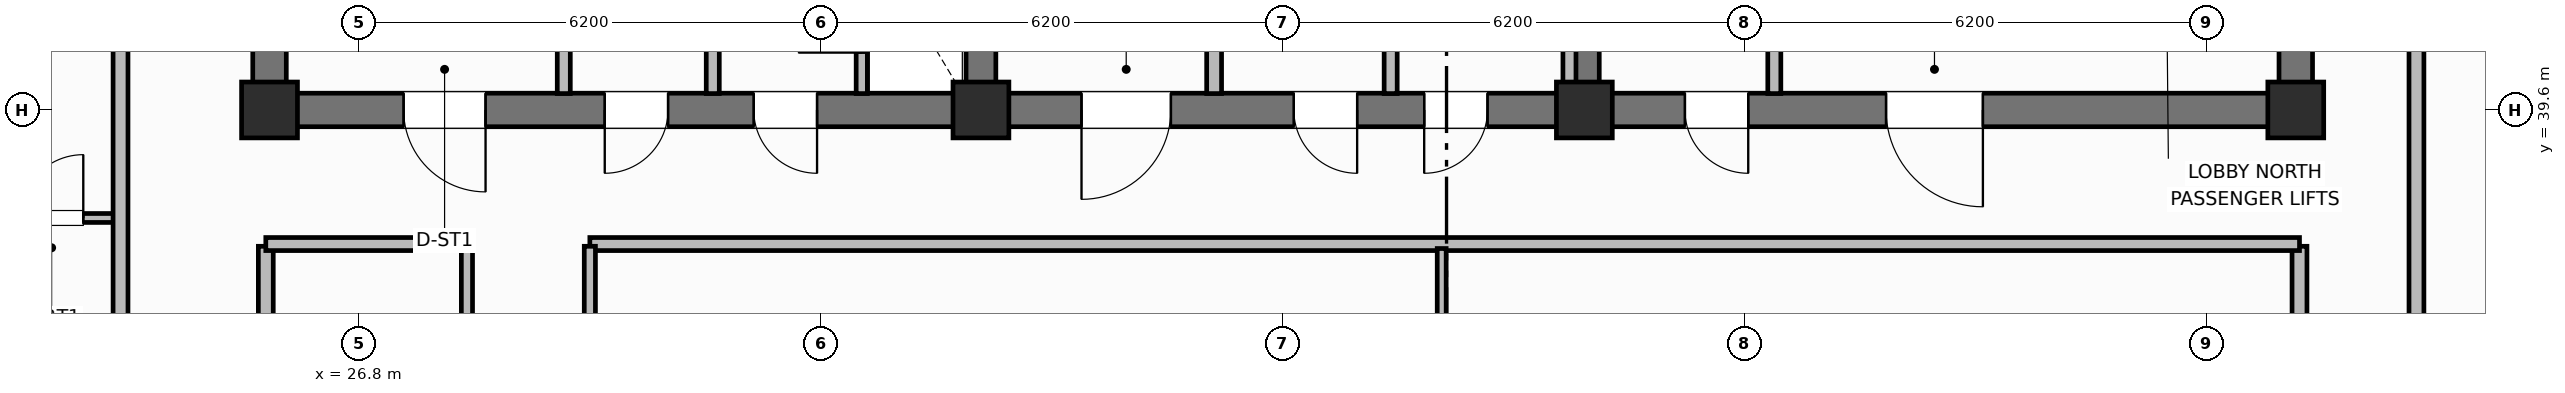
"""IFC4 building model, lengths in metres.
Left out: names, types, materials, properties, quantities, classifications, styles, units other than length and angle.
Written with IfcOpenShell. Run it as: python <this file> out.ifc"""

import sys

from ifc_helpers import new_model, si_unit, direction, frame, frame_2d, origin, origin_2d, place, context, subcontext, project, spatial, rectangle, extrude, element, fill, save


model = new_model("IFC4")
c1 = context("Model", 3, precision=1e-05, world=origin(), true_north=direction((0.0, 1.0)))
c2 = subcontext(c1, "Body", "Model", "MODEL_VIEW")
j1 = project(units=[si_unit("LENGTHUNIT", "METRE"), si_unit("PLANEANGLEUNIT", "RADIAN")], contexts=[c1])
p1 = place(None, origin())
s1 = spatial("IfcSite", under=j1, at=p1, CompositionType="ELEMENT")
p2 = place(p1, origin())
s2 = spatial("IfcBuilding", under=s1, at=p2, CompositionType="ELEMENT")
p3 = place(p2, frame((0.0, 0.0, 293.5)))
s3 = spatial("IfcBuildingStorey", under=s2, at=p3, CompositionType="ELEMENT", Elevation=293.5)
for number, where, z_axis, x_axis in (
    (1, (25.6, 39.825, 0.0), (0.0, 0.0, 1.0), (0.0, 1.0, 0.0)),
    (2, (52.8, 39.825, 0.0), (0.0, 0.0, 1.0), (0.0, 1.0, 0.0)),
):
    element("IfcWall", number, at=place(p3, frame(where, z_axis=z_axis, x_axis=x_axis)), inside=s3, PredefinedType="SHEAR", context=c2, shape_type="SweptSolid", body=[
        extrude(rectangle(XDim=5.75, YDim=0.45, at=frame_2d((2.875, 0.0))), origin(), (0.0, 0.0, 1.0), 3.7),
    ])
p4 = place(p3, frame((52.8, 39.6, 0.0), z_axis=(0.0, 0.0, 1.0), x_axis=(-1.0, 0.0, 0.0)))
e3 = element("IfcWall", 3, at=p4, inside=s3, PredefinedType="SHEAR", context=c2, shape_type="SweptSolid", body=[
    extrude(rectangle(XDim=27.2, YDim=0.45, at=frame_2d((13.6, 0.0))), origin(), (0.0, 0.0, 1.0), 3.7),
])
p5 = place(p4, frame((24.3, 0.0, 0.0)))
e4 = element("IfcOpeningElement", 4, at=p5, cuts=e3, PredefinedType="OPENING", context=c2, shape_type="SweptSolid", body=[
    extrude(rectangle(XDim=1.1, YDim=2.15, at=frame_2d((0.55, 1.075))), frame((0.0, 0.235, 0.0), z_axis=(0.0, -1.0, 0.0), x_axis=(1.0, 0.0, 0.0)), (0.0, 0.0, 1.0), 0.47),
])
p6 = place(p4, frame((21.85, 0.0, 0.0)))
e5 = element("IfcOpeningElement", 5, at=p6, cuts=e3, PredefinedType="OPENING", context=c2, shape_type="SweptSolid", body=[
    extrude(rectangle(XDim=0.85, YDim=2.1, at=frame_2d((0.425, 1.05))), frame((0.0, 0.235, 0.0), z_axis=(0.0, -1.0, 0.0), x_axis=(1.0, 0.0, 0.0)), (0.0, 0.0, 1.0), 0.47),
])
p7 = place(p4, frame((19.85, 0.0, 0.0)))
e6 = element("IfcOpeningElement", 6, at=p7, cuts=e3, PredefinedType="OPENING", context=c2, shape_type="SweptSolid", body=[
    extrude(rectangle(XDim=0.85, YDim=2.1, at=frame_2d((0.425, 1.05))), frame((0.0, 0.235, 0.0), z_axis=(0.0, -1.0, 0.0), x_axis=(1.0, 0.0, 0.0)), (0.0, 0.0, 1.0), 0.47),
])
p8 = place(p4, frame((15.1, 0.0, 0.0)))
e7 = element("IfcOpeningElement", 7, at=p8, cuts=e3, PredefinedType="OPENING", context=c2, shape_type="SweptSolid", body=[
    extrude(rectangle(XDim=1.2, YDim=2.15, at=frame_2d((0.6, 1.075))), frame((0.0, 0.235, 0.0), z_axis=(0.0, -1.0, 0.0), x_axis=(1.0, 0.0, 0.0)), (0.0, 0.0, 1.0), 0.47),
])
p9 = place(p4, frame((12.6, 0.0, 0.0)))
e8 = element("IfcOpeningElement", 8, at=p9, cuts=e3, PredefinedType="OPENING", context=c2, shape_type="SweptSolid", body=[
    extrude(rectangle(XDim=0.85, YDim=2.1, at=frame_2d((0.425, 1.05))), frame((0.0, 0.235, 0.0), z_axis=(0.0, -1.0, 0.0), x_axis=(1.0, 0.0, 0.0)), (0.0, 0.0, 1.0), 0.47),
])
p10 = place(p4, frame((10.85, 0.0, 0.0)))
e9 = element("IfcOpeningElement", 9, at=p10, cuts=e3, PredefinedType="OPENING", context=c2, shape_type="SweptSolid", body=[
    extrude(rectangle(XDim=0.85, YDim=2.1, at=frame_2d((0.425, 1.05))), frame((0.0, 0.235, 0.0), z_axis=(0.0, -1.0, 0.0), x_axis=(1.0, 0.0, 0.0)), (0.0, 0.0, 1.0), 0.47),
])
p11 = place(p4, frame((7.35, 0.0, 0.0)))
e10 = element("IfcOpeningElement", 10, at=p11, cuts=e3, PredefinedType="OPENING", context=c2, shape_type="SweptSolid", body=[
    extrude(rectangle(XDim=0.85, YDim=2.1, at=frame_2d((0.425, 1.05))), frame((0.0, 0.235, 0.0), z_axis=(0.0, -1.0, 0.0), x_axis=(1.0, 0.0, 0.0)), (0.0, 0.0, 1.0), 0.47),
])
p12 = place(p4, frame((4.2, 0.0, 0.0)))
e11 = element("IfcOpeningElement", 11, at=p12, cuts=e3, PredefinedType="OPENING", context=c2, shape_type="SweptSolid", body=[
    extrude(rectangle(XDim=1.3, YDim=2.2, at=frame_2d((0.65, 1.1))), frame((0.0, 0.235, 0.0), z_axis=(0.0, -1.0, 0.0), x_axis=(1.0, 0.0, 0.0)), (0.0, 0.0, 1.0), 0.47),
])
for number, where, z_axis, x_axis in (
    (12, (35.15, 39.825, 0.0), (0.0, 0.0, 1.0), (0.0, 1.0, 0.0)),
    (13, (43.25, 39.825, 0.0), (0.0, 0.0, 1.0), (0.0, 1.0, 0.0)),
):
    element("IfcWall", number, at=place(p3, frame(where, z_axis=z_axis, x_axis=x_axis)), inside=s3, PredefinedType="SHEAR", context=c2, shape_type="SweptSolid", body=[
        extrude(rectangle(XDim=5.75, YDim=0.4, at=frame_2d((2.875, 0.0))), origin(), (0.0, 0.0, 1.0), 3.7),
    ])
for number, where, z_axis, x_axis in (
    (14, (25.6, 39.6, 0.0), (0.0, 0.0, 1.0), (1.0, 0.0, 0.0)),
    (15, (35.15, 39.6, 0.0), (0.0, 0.0, 1.0), (1.0, 0.0, 0.0)),
    (16, (43.25, 39.6, 0.0), (0.0, 0.0, 1.0), (1.0, 0.0, 0.0)),
    (17, (52.8, 39.6, 0.0), (0.0, 0.0, 1.0), (1.0, 0.0, 0.0)),
):
    element("IfcColumn", number, at=place(p3, frame(where, z_axis=z_axis, x_axis=x_axis)), inside=s3, PredefinedType="COLUMN", context=c2, shape_type="SweptSolid", body=[
        extrude(rectangle(XDim=0.75, YDim=0.75, at=origin_2d()), origin(), (0.0, 0.0, 1.0), 3.7),
    ])
p13 = place(p3, frame((33.55, 39.82, 0.0), z_axis=(0.0, 0.0, 1.0), x_axis=(0.0, 1.0, 0.0)))
e18 = element("IfcWall", 18, at=p13, inside=s3, PredefinedType="PARTITIONING", context=c2, shape_type="SweptSolid", body=[
    extrude(rectangle(XDim=2.13, YDim=0.15, at=frame_2d((1.065, 0.0))), origin(), (0.0, 0.0, 1.0), 2.54),
])
p14 = place(p13, frame((0.55, 0.0, 0.0)))
e19 = element("IfcOpeningElement", 19, at=p14, cuts=e18, PredefinedType="OPENING", context=c2, shape_type="SweptSolid", body=[
    extrude(rectangle(XDim=0.85, YDim=2.05, at=frame_2d((0.425, 1.025))), frame((0.0, 0.085, 0.0), z_axis=(0.0, -1.0, 0.0), x_axis=(1.0, 0.0, 0.0)), (0.0, 0.0, 1.0), 0.17),
])
for number, where, z_axis, x_axis in (
    (20, (29.55, 39.82, 0.0), (0.0, 0.0, 1.0), (0.0, 1.0, 0.0)),
    (21, (31.55, 39.82, 0.0), (0.0, 0.0, 1.0), (0.0, 1.0, 0.0)),
):
    element("IfcWall", number, at=place(p3, frame(where, z_axis=z_axis, x_axis=x_axis)), inside=s3, PredefinedType="PARTITIONING", context=c2, shape_type="SweptSolid", body=[
        extrude(rectangle(XDim=2.13, YDim=0.175, at=frame_2d((1.065, 0.0))), origin(), (0.0, 0.0, 1.0), 2.54),
    ])
p15 = place(p3, frame((38.28, 39.82, 0.0), z_axis=(0.0, 0.0, 1.0), x_axis=(0.0, 1.0, 0.0)))
e22 = element("IfcWall", 22, at=p15, inside=s3, PredefinedType="PARTITIONING", context=c2, shape_type="SweptSolid", body=[
    extrude(rectangle(XDim=5.63, YDim=0.2, at=frame_2d((2.815, 0.0))), origin(), (0.0, 0.0, 1.0), 2.54),
])
for number, where, z_axis, x_axis in (
    (23, (43.05, 39.82, 0.0), (0.0, 0.0, 1.0), (0.0, 1.0, 0.0)),
    (24, (40.65, 39.82, 0.0), (0.0, 0.0, 1.0), (0.0, 1.0, 0.0)),
    (25, (45.8, 39.82, 0.0), (0.0, 0.0, 1.0), (0.0, 1.0, 0.0)),
):
    element("IfcWall", number, at=place(p3, frame(where, z_axis=z_axis, x_axis=x_axis)), inside=s3, PredefinedType="PARTITIONING", context=c2, shape_type="SweptSolid", body=[
        extrude(rectangle(XDim=5.63, YDim=0.175, at=frame_2d((2.815, 0.0))), origin(), (0.0, 0.0, 1.0), 2.54),
    ])
for number, where, z_axis, x_axis in (
    (26, (25.55, 18.63, 0.0), (0.0, 0.0, 1.0), (0.0, 1.0, 0.0)),
    (27, (52.85, 18.63, 0.0), (0.0, 0.0, 1.0), (0.0, 1.0, 0.0)),
):
    element("IfcWall", number, at=place(p3, frame(where, z_axis=z_axis, x_axis=x_axis)), inside=s3, PredefinedType="PARTITIONING", context=c2, shape_type="SweptSolid", body=[
        extrude(rectangle(XDim=19.14, YDim=0.2, at=frame_2d((9.57, 0.0))), origin(), (0.0, 0.0, 1.0), 2.54),
    ])
p16 = place(p3, frame((25.55, 37.8, 0.0), z_axis=(0.0, 0.0, 1.0), x_axis=(1.0, 0.0, 0.0)))
e28 = element("IfcWall", 28, at=p16, inside=s3, PredefinedType="PARTITIONING", context=c2, shape_type="SweptSolid", body=[
    extrude(rectangle(XDim=2.7, YDim=0.175, at=frame_2d((1.35, 0.0))), origin(), (0.0, 0.0, 1.0), 2.54),
])
p17 = place(p3, frame((29.9, 37.8, 0.0), z_axis=(0.0, 0.0, 1.0), x_axis=(1.0, 0.0, 0.0)))
e29 = element("IfcWall", 29, at=p17, inside=s3, PredefinedType="PARTITIONING", context=c2, shape_type="SweptSolid", body=[
    extrude(rectangle(XDim=22.95, YDim=0.175, at=frame_2d((11.475, 0.0))), origin(), (0.0, 0.0, 1.0), 2.54),
])
p18 = place(p3, frame((41.335, 25.56, 0.0), z_axis=(0.0, 0.0, 1.0), x_axis=(0.0, 1.0, 0.0)))
e30 = element("IfcWall", 30, at=p18, inside=s3, PredefinedType="PARTITIONING", context=c2, shape_type="SweptSolid", body=[
    extrude(rectangle(XDim=12.18, YDim=0.12, at=frame_2d((6.09, 0.0))), origin(), (0.0, 0.0, 1.0), 2.54),
])
p19 = place(p18, frame((2.0, 0.0, 0.0)))
e31 = element("IfcOpeningElement", 31, at=p19, cuts=e30, PredefinedType="OPENING", context=c2, shape_type="SweptSolid", body=[
    extrude(rectangle(XDim=0.9, YDim=2.1, at=frame_2d((0.45, 1.05))), frame((0.0, 0.07, 0.0), z_axis=(0.0, -1.0, 0.0), x_axis=(1.0, 0.0, 0.0)), (0.0, 0.0, 1.0), 0.14),
])
p20 = place(p3, frame((28.25, 18.63, 0.0), z_axis=(0.0, 0.0, 1.0), x_axis=(0.0, 1.0, 0.0)))
e32 = element("IfcWall", 32, at=p20, inside=s3, PredefinedType="PARTITIONING", context=c2, shape_type="SweptSolid", body=[
    extrude(rectangle(XDim=19.14, YDim=0.15, at=frame_2d((9.57, 0.0))), origin(), (0.0, 0.0, 1.0), 2.54),
])
p21 = place(p20, frame((3.0, 0.0, 0.0)))
e33 = element("IfcOpeningElement", 33, at=p21, cuts=e32, PredefinedType="OPENING", context=c2, shape_type="SweptSolid", body=[
    extrude(rectangle(XDim=0.9, YDim=2.1, at=frame_2d((0.45, 1.05))), frame((0.0, 0.085, 0.0), z_axis=(0.0, -1.0, 0.0), x_axis=(1.0, 0.0, 0.0)), (0.0, 0.0, 1.0), 0.17),
])
p22 = place(p20, frame((11.5, 0.0, 0.0)))
e34 = element("IfcOpeningElement", 34, at=p22, cuts=e32, PredefinedType="OPENING", context=c2, shape_type="SweptSolid", body=[
    extrude(rectangle(XDim=0.9, YDim=2.1, at=frame_2d((0.45, 1.05))), frame((0.0, 0.085, 0.0), z_axis=(0.0, -1.0, 0.0), x_axis=(1.0, 0.0, 0.0)), (0.0, 0.0, 1.0), 0.17),
])
p23 = place(p3, frame((29.9, 18.63, 0.0), z_axis=(0.0, 0.0, 1.0), x_axis=(0.0, 1.0, 0.0)))
e35 = element("IfcWall", 35, at=p23, inside=s3, PredefinedType="PARTITIONING", context=c2, shape_type="SweptSolid", body=[
    extrude(rectangle(XDim=19.14, YDim=0.15, at=frame_2d((9.57, 0.0))), origin(), (0.0, 0.0, 1.0), 2.54),
])
p24 = place(p23, frame((2.2, 0.0, 0.0)))
e36 = element("IfcOpeningElement", 36, at=p24, cuts=e35, PredefinedType="OPENING", context=c2, shape_type="SweptSolid", body=[
    extrude(rectangle(XDim=1.0, YDim=2.15, at=frame_2d((0.5, 1.075))), frame((0.0, 0.085, 0.0), z_axis=(0.0, -1.0, 0.0), x_axis=(1.0, 0.0, 0.0)), (0.0, 0.0, 1.0), 0.17),
])
p25 = place(p23, frame((8.89, 0.0, 0.0)))
e37 = element("IfcOpeningElement", 37, at=p25, cuts=e35, PredefinedType="OPENING", context=c2, shape_type="SweptSolid", body=[
    extrude(rectangle(XDim=1.0, YDim=2.15, at=frame_2d((0.5, 1.075))), frame((0.0, 0.085, 0.0), z_axis=(0.0, -1.0, 0.0), x_axis=(1.0, 0.0, 0.0)), (0.0, 0.0, 1.0), 0.17),
])
p26 = place(p3, frame((21.65, 38.15, 0.0), z_axis=(0.0, 0.0, 1.0), x_axis=(1.0, 0.0, 0.0)))
e38 = element("IfcWall", 38, at=p26, inside=s3, PredefinedType="PARTITIONING", context=c2, shape_type="SweptSolid", body=[
    extrude(rectangle(XDim=1.95, YDim=0.12, at=frame_2d((0.975, 0.0))), origin(), (0.0, 0.0, 1.0), 2.54),
])
p27 = place(p26, frame((0.6, 0.0, 0.0)))
e39 = element("IfcOpeningElement", 39, at=p27, cuts=e38, PredefinedType="OPENING", context=c2, shape_type="SweptSolid", body=[
    extrude(rectangle(XDim=0.85, YDim=2.1, at=frame_2d((0.425, 1.05))), frame((0.0, 0.07, 0.0), z_axis=(0.0, -1.0, 0.0), x_axis=(1.0, 0.0, 0.0)), (0.0, 0.0, 1.0), 0.14),
])
p28 = place(p3, frame((23.6, 9.95, 0.0), z_axis=(0.0, 0.0, 1.0), x_axis=(0.0, 1.0, 0.0)))
e40 = element("IfcWall", 40, at=p28, inside=s3, PredefinedType="PARTITIONING", context=c2, shape_type="SweptSolid", body=[
    extrude(rectangle(XDim=36.5, YDim=0.2, at=frame_2d((18.25, 0.0))), origin(), (0.0, 0.0, 1.0), 2.54),
])
p29 = place(p28, frame((3.25, 0.0, 0.0)))
e41 = element("IfcOpeningElement", 41, at=p29, cuts=e40, PredefinedType="OPENING", context=c2, shape_type="SweptSolid", body=[
    extrude(rectangle(XDim=1.0, YDim=2.15, at=frame_2d((0.5, 1.075))), frame((0.0, 0.11, 0.0), z_axis=(0.0, -1.0, 0.0), x_axis=(1.0, 0.0, 0.0)), (0.0, 0.0, 1.0), 0.22),
])
p30 = place(p28, frame((23.5, 0.0, 0.0)))
e42 = element("IfcOpeningElement", 42, at=p30, cuts=e40, PredefinedType="OPENING", context=c2, shape_type="SweptSolid", body=[
    extrude(rectangle(XDim=1.0, YDim=2.15, at=frame_2d((0.5, 1.075))), frame((0.0, 0.11, 0.0), z_axis=(0.0, -1.0, 0.0), x_axis=(1.0, 0.0, 0.0)), (0.0, 0.0, 1.0), 0.22),
])
p31 = place(p3, frame((54.42, 9.95, 0.0), z_axis=(0.0, 0.0, 1.0), x_axis=(0.0, 1.0, 0.0)))
e43 = element("IfcWall", 43, at=p31, inside=s3, PredefinedType="PARTITIONING", context=c2, shape_type="SweptSolid", body=[
    extrude(rectangle(XDim=36.5, YDim=0.2, at=frame_2d((18.25, 0.0))), origin(), (0.0, 0.0, 1.0), 2.54),
])
p32 = place(p31, frame((3.25, 0.0, 0.0)))
e44 = element("IfcOpeningElement", 44, at=p32, cuts=e43, PredefinedType="OPENING", context=c2, shape_type="SweptSolid", body=[
    extrude(rectangle(XDim=1.0, YDim=2.15, at=frame_2d((0.5, 1.075))), frame((0.0, 0.11, 0.0), z_axis=(0.0, -1.0, 0.0), x_axis=(1.0, 0.0, 0.0)), (0.0, 0.0, 1.0), 0.22),
])
p33 = place(p31, frame((14.25, 0.0, 0.0)))
e45 = element("IfcOpeningElement", 45, at=p33, cuts=e43, PredefinedType="OPENING", context=c2, shape_type="SweptSolid", body=[
    extrude(rectangle(XDim=1.0, YDim=2.15, at=frame_2d((0.5, 1.075))), frame((0.0, 0.11, 0.0), z_axis=(0.0, -1.0, 0.0), x_axis=(1.0, 0.0, 0.0)), (0.0, 0.0, 1.0), 0.22),
])
p34 = place(p14, origin())
e46 = element("IfcDoor", 46, at=p34, inside=s3, OperationType="SINGLE_SWING_LEFT", PredefinedType="TRAPDOOR", context=c2, shape_type="SweptSolid", body=[
    extrude(rectangle(XDim=0.85, YDim=2.05, at=frame_2d((0.425, 1.025))), frame((0.0, 0.025, 0.0), z_axis=(0.0, -1.0, 0.0), x_axis=(1.0, 0.0, 0.0)), (0.0, 0.0, 1.0), 0.05),
])
fill(e19, e46)
p35 = place(p27, origin())
e47 = element("IfcDoor", 47, at=p35, inside=s3, OperationType="SINGLE_SWING_RIGHT", PredefinedType="DOOR", context=c2, shape_type="SweptSolid", body=[
    extrude(rectangle(XDim=0.85, YDim=2.1, at=frame_2d((0.425, 1.05))), frame((0.0, 0.025, 0.0), z_axis=(0.0, -1.0, 0.0), x_axis=(1.0, 0.0, 0.0)), (0.0, 0.0, 1.0), 0.05),
])
fill(e39, e47)
p36 = place(p5, origin())
e48 = element("IfcDoor", 48, at=p36, inside=s3, OperationType="SINGLE_SWING_LEFT", PredefinedType="DOOR", context=c2, shape_type="SweptSolid", body=[
    extrude(rectangle(XDim=1.1, YDim=2.15, at=frame_2d((0.55, 1.075))), frame((0.0, 0.025, 0.0), z_axis=(0.0, -1.0, 0.0), x_axis=(1.0, 0.0, 0.0)), (0.0, 0.0, 1.0), 0.05),
])
fill(e4, e48)
p37 = place(p6, origin())
e49 = element("IfcDoor", 49, at=p37, inside=s3, OperationType="SINGLE_SWING_RIGHT", PredefinedType="DOOR", context=c2, shape_type="SweptSolid", body=[
    extrude(rectangle(XDim=0.85, YDim=2.1, at=frame_2d((0.425, 1.05))), frame((0.0, 0.025, 0.0), z_axis=(0.0, -1.0, 0.0), x_axis=(1.0, 0.0, 0.0)), (0.0, 0.0, 1.0), 0.05),
])
fill(e5, e49)
p38 = place(p7, origin())
e50 = element("IfcDoor", 50, at=p38, inside=s3, OperationType="SINGLE_SWING_LEFT", PredefinedType="DOOR", context=c2, shape_type="SweptSolid", body=[
    extrude(rectangle(XDim=0.85, YDim=2.1, at=frame_2d((0.425, 1.05))), frame((0.0, 0.025, 0.0), z_axis=(0.0, -1.0, 0.0), x_axis=(1.0, 0.0, 0.0)), (0.0, 0.0, 1.0), 0.05),
])
fill(e6, e50)
p39 = place(p8, origin())
e51 = element("IfcDoor", 51, at=p39, inside=s3, OperationType="SINGLE_SWING_RIGHT", PredefinedType="DOOR", context=c2, shape_type="SweptSolid", body=[
    extrude(rectangle(XDim=1.2, YDim=2.15, at=frame_2d((0.6, 1.075))), frame((0.0, 0.025, 0.0), z_axis=(0.0, -1.0, 0.0), x_axis=(1.0, 0.0, 0.0)), (0.0, 0.0, 1.0), 0.05),
])
fill(e7, e51)
p40 = place(p9, origin())
e52 = element("IfcDoor", 52, at=p40, inside=s3, OperationType="SINGLE_SWING_LEFT", PredefinedType="DOOR", context=c2, shape_type="SweptSolid", body=[
    extrude(rectangle(XDim=0.85, YDim=2.1, at=frame_2d((0.425, 1.05))), frame((0.0, 0.025, 0.0), z_axis=(0.0, -1.0, 0.0), x_axis=(1.0, 0.0, 0.0)), (0.0, 0.0, 1.0), 0.05),
])
fill(e8, e52)
p41 = place(p10, origin())
e53 = element("IfcDoor", 53, at=p41, inside=s3, OperationType="SINGLE_SWING_RIGHT", PredefinedType="DOOR", context=c2, shape_type="SweptSolid", body=[
    extrude(rectangle(XDim=0.85, YDim=2.1, at=frame_2d((0.425, 1.05))), frame((0.0, 0.025, 0.0), z_axis=(0.0, -1.0, 0.0), x_axis=(1.0, 0.0, 0.0)), (0.0, 0.0, 1.0), 0.05),
])
fill(e9, e53)
p42 = place(p11, origin())
e54 = element("IfcDoor", 54, at=p42, inside=s3, OperationType="SINGLE_SWING_LEFT", PredefinedType="DOOR", context=c2, shape_type="SweptSolid", body=[
    extrude(rectangle(XDim=0.85, YDim=2.1, at=frame_2d((0.425, 1.05))), frame((0.0, 0.025, 0.0), z_axis=(0.0, -1.0, 0.0), x_axis=(1.0, 0.0, 0.0)), (0.0, 0.0, 1.0), 0.05),
])
fill(e10, e54)
p43 = place(p12, origin())
e55 = element("IfcDoor", 55, at=p43, inside=s3, OperationType="SINGLE_SWING_LEFT", PredefinedType="DOOR", context=c2, shape_type="SweptSolid", body=[
    extrude(rectangle(XDim=1.3, YDim=2.2, at=frame_2d((0.65, 1.1))), frame((0.0, 0.025, 0.0), z_axis=(0.0, -1.0, 0.0), x_axis=(1.0, 0.0, 0.0)), (0.0, 0.0, 1.0), 0.05),
])
fill(e11, e55)
save(model, sys.argv[1])
